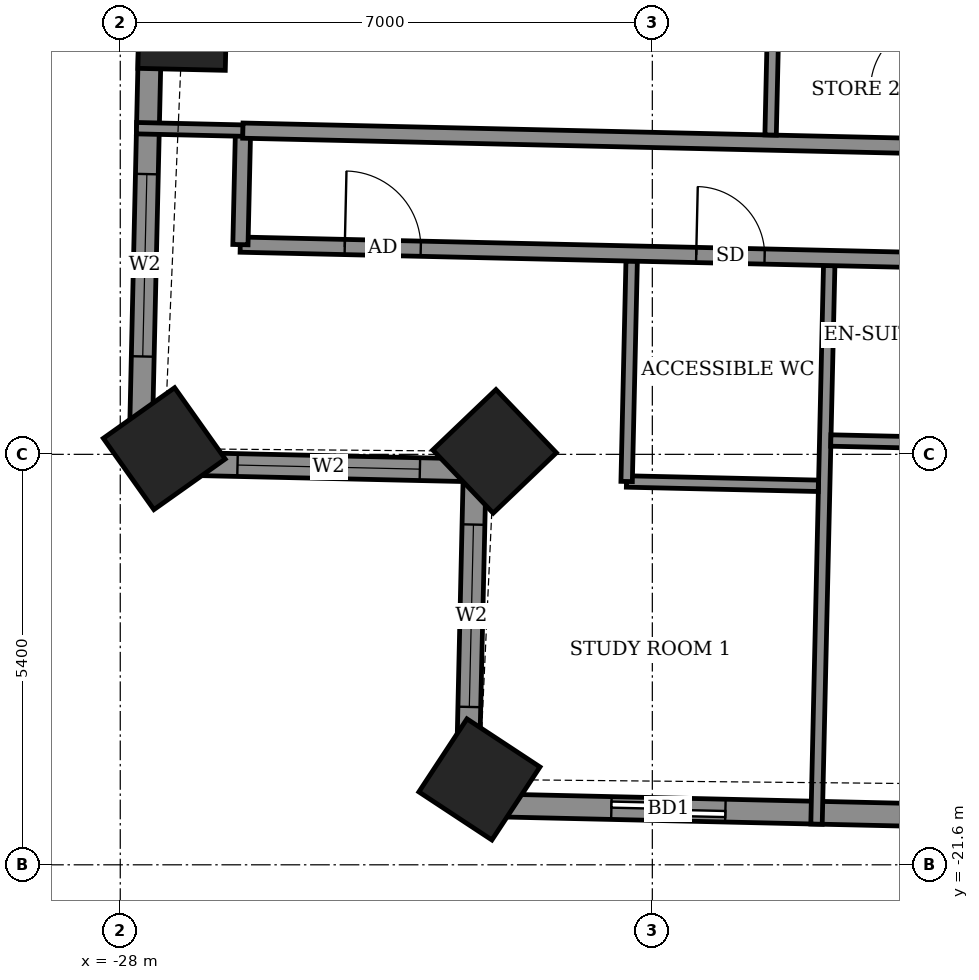
"""IFC4 building model, lengths in metres.
Left out: names, types, materials, properties, quantities, classifications, styles, units other than length and angle.
Written with IfcOpenShell. Run it as: python <this file> out.ifc"""

import sys

from ifc_helpers import new_model, si_unit, direction, frame, frame_2d, origin, origin_2d, place, context, subcontext, project, spatial, rectangle, extrude, element, fill, save


model = new_model("IFC4")
c1 = context("Model", 3, precision=1e-05, world=origin(), true_north=direction((0.0, 1.0)))
c2 = subcontext(c1, "Body", "Model", "MODEL_VIEW")
j1 = project(units=[si_unit("LENGTHUNIT", "METRE"), si_unit("PLANEANGLEUNIT", "RADIAN")], contexts=[c1])
p1 = place(None, origin())
s1 = spatial("IfcSite", under=j1, at=p1, CompositionType="ELEMENT")
p2 = place(p1, origin())
s2 = spatial("IfcBuilding", under=s1, at=p2, CompositionType="ELEMENT")
p3 = place(p2, frame((0.0, 0.0, 201.5)))
s3 = spatial("IfcBuildingStorey", under=s2, at=p3, CompositionType="ELEMENT", Elevation=201.5)
for number, where, z_axis, x_axis in (
    (1, (-27.18, -10.56, -0.55), (0.0, 0.0, 1.0), (-0.023, -1.0, 0.0)),
    (2, (-27.421, -16.125, -0.55), (0.0, 0.0, 1.0), (0.579, -0.816, 0.0)),
    (3, (-23.075, -16.161, -0.55), (0.0, 0.0, 1.0), (0.691, -0.723, 0.0)),
    (4, (-23.275, -20.477, -0.55), (0.0, 0.0, 1.0), (0.835, -0.55, 0.0)),
):
    element("IfcColumn", number, at=place(p3, frame(where, z_axis=z_axis, x_axis=x_axis)), inside=s3, PredefinedType="COLUMN", context=c2, shape_type="SweptSolid", body=[
        extrude(rectangle(XDim=1.15, YDim=1.15, at=origin_2d()), origin(), (0.0, 0.0, 1.0), 3.6),
    ])
p4 = place(p3, frame((-27.47, -4.585, 0.0), z_axis=(0.0, 0.0, 1.0), x_axis=(-0.022686419344, -0.999742630069, 0.0)))
e5 = element("IfcWall", 5, at=p4, inside=s3, PredefinedType="SOLIDWALL", context=c2, shape_type="SweptSolid", body=[
    extrude(rectangle(XDim=11.73, YDim=0.3, at=frame_2d((5.865, 0.0))), origin(), (0.0, 0.0, 1.0), 2.55),
])
p5 = place(p4, frame((2.261, 0.0, 0.0)))
e6 = element("IfcOpeningElement", 6, at=p5, cuts=e5, PredefinedType="OPENING", context=c2, shape_type="SweptSolid", body=[
    extrude(rectangle(XDim=1.5, YDim=2.4, at=frame_2d((0.75, 1.2))), frame((0.0, 0.16, 0.0), z_axis=(0.0, -1.0, 0.0), x_axis=(1.0, 0.0, 0.0)), (0.0, 0.0, 1.0), 0.32),
])
p6 = place(p4, frame((7.93, 0.0, 0.9)))
e7 = element("IfcOpeningElement", 7, at=p6, cuts=e5, PredefinedType="OPENING", context=c2, shape_type="SweptSolid", body=[
    extrude(rectangle(XDim=2.4, YDim=1.5, at=frame_2d((1.2, 0.75))), frame((0.0, 0.16, 0.0), z_axis=(0.0, -1.0, 0.0), x_axis=(1.0, 0.0, 0.0)), (0.0, 0.0, 1.0), 0.32),
])
p7 = place(p3, frame((-27.736, -16.312, 0.0), z_axis=(0.0, 0.0, 1.0), x_axis=(0.999747504193, -0.022470599878, 0.0)))
e8 = element("IfcWall", 8, at=p7, inside=s3, PredefinedType="SOLIDWALL", context=c2, shape_type="SweptSolid", body=[
    extrude(rectangle(XDim=4.4, YDim=0.3, at=frame_2d((2.2, 0.0))), origin(), (0.0, 0.0, 1.0), 2.55),
])
p8 = place(p7, frame((1.279, 0.0, 0.9)))
e9 = element("IfcOpeningElement", 9, at=p8, cuts=e8, PredefinedType="OPENING", context=c2, shape_type="SweptSolid", body=[
    extrude(rectangle(XDim=2.4, YDim=1.5, at=frame_2d((1.2, 0.75))), frame((0.0, 0.16, 0.0), z_axis=(0.0, -1.0, 0.0), x_axis=(1.0, 0.0, 0.0)), (0.0, 0.0, 1.0), 0.32),
])
p9 = place(p3, frame((-23.337, -16.411, 0.0), z_axis=(0.0, 0.0, 1.0), x_axis=(-0.022747872013, -0.999741233679, 0.0)))
e10 = element("IfcWall", 10, at=p9, inside=s3, PredefinedType="SOLIDWALL", context=c2, shape_type="SweptSolid", body=[
    extrude(rectangle(XDim=4.4, YDim=0.3, at=frame_2d((2.2, 0.0))), origin(), (0.0, 0.0, 1.0), 2.55),
])
p10 = place(p9, frame((0.713, 0.0, 0.9)))
e11 = element("IfcOpeningElement", 11, at=p10, cuts=e10, PredefinedType="OPENING", context=c2, shape_type="SweptSolid", body=[
    extrude(rectangle(XDim=2.4, YDim=1.5, at=frame_2d((1.2, 0.75))), frame((0.0, 0.16, 0.0), z_axis=(0.0, -1.0, 0.0), x_axis=(1.0, 0.0, 0.0)), (0.0, 0.0, 1.0), 0.32),
])
p11 = place(p3, frame((-23.437, -20.81, 0.0), z_axis=(0.0, 0.0, 1.0), x_axis=(0.999742269115, -0.022702320244, 0.0)))
e12 = element("IfcWall", 12, at=p11, inside=s3, PredefinedType="SOLIDWALL", context=c2, shape_type="SweptSolid", body=[
    extrude(rectangle(XDim=41.844, YDim=0.3, at=frame_2d((20.922, 0.0))), origin(), (0.0, 0.0, 1.0), 2.55),
])
p12 = place(p11, frame((1.899, 0.0, 0.0)))
e13 = element("IfcOpeningElement", 13, at=p12, cuts=e12, PredefinedType="OPENING", context=c2, shape_type="SweptSolid", body=[
    extrude(rectangle(XDim=1.5, YDim=2.4, at=frame_2d((0.75, 1.2))), frame((0.0, 0.16, 0.0), z_axis=(0.0, -1.0, 0.0), x_axis=(1.0, 0.0, 0.0)), (0.0, 0.0, 1.0), 0.32),
])
p13 = place(p11, frame((7.575, 0.0, 0.0)))
e14 = element("IfcOpeningElement", 14, at=p13, cuts=e12, PredefinedType="OPENING", context=c2, shape_type="SweptSolid", body=[
    extrude(rectangle(XDim=1.2, YDim=2.4, at=frame_2d((0.6, 1.2))), frame((0.0, 0.16, 0.0), z_axis=(0.0, -1.0, 0.0), x_axis=(1.0, 0.0, 0.0)), (0.0, 0.0, 1.0), 0.32),
])
p14 = place(p11, frame((10.612, 0.0, 0.0)))
e15 = element("IfcOpeningElement", 15, at=p14, cuts=e12, PredefinedType="OPENING", context=c2, shape_type="SweptSolid", body=[
    extrude(rectangle(XDim=1.5, YDim=2.4, at=frame_2d((0.75, 1.2))), frame((0.0, 0.16, 0.0), z_axis=(0.0, -1.0, 0.0), x_axis=(1.0, 0.0, 0.0)), (0.0, 0.0, 1.0), 0.32),
])
p15 = place(p11, frame((15.762, 0.0, 0.0)))
e16 = element("IfcOpeningElement", 16, at=p15, cuts=e12, PredefinedType="OPENING", context=c2, shape_type="SweptSolid", body=[
    extrude(rectangle(XDim=1.5, YDim=2.4, at=frame_2d((0.75, 1.2))), frame((0.0, 0.16, 0.0), z_axis=(0.0, -1.0, 0.0), x_axis=(1.0, 0.0, 0.0)), (0.0, 0.0, 1.0), 0.32),
])
p16 = place(p11, frame((21.648, 0.0, 0.0)))
e17 = element("IfcOpeningElement", 17, at=p16, cuts=e12, PredefinedType="OPENING", context=c2, shape_type="SweptSolid", body=[
    extrude(rectangle(XDim=1.2, YDim=2.4, at=frame_2d((0.6, 1.2))), frame((0.0, 0.16, 0.0), z_axis=(0.0, -1.0, 0.0), x_axis=(1.0, 0.0, 0.0)), (0.0, 0.0, 1.0), 0.32),
])
p17 = place(p11, frame((24.685, 0.0, 0.0)))
e18 = element("IfcOpeningElement", 18, at=p17, cuts=e12, PredefinedType="OPENING", context=c2, shape_type="SweptSolid", body=[
    extrude(rectangle(XDim=1.5, YDim=2.4, at=frame_2d((0.75, 1.2))), frame((0.0, 0.16, 0.0), z_axis=(0.0, -1.0, 0.0), x_axis=(1.0, 0.0, 0.0)), (0.0, 0.0, 1.0), 0.32),
])
p18 = place(p11, frame((29.685, 0.0, 0.0)))
e19 = element("IfcOpeningElement", 19, at=p18, cuts=e12, PredefinedType="OPENING", context=c2, shape_type="SweptSolid", body=[
    extrude(rectangle(XDim=1.5, YDim=2.4, at=frame_2d((0.75, 1.2))), frame((0.0, 0.16, 0.0), z_axis=(0.0, -1.0, 0.0), x_axis=(1.0, 0.0, 0.0)), (0.0, 0.0, 1.0), 0.32),
])
p19 = place(p11, frame((33.022, 0.0, 0.0)))
e20 = element("IfcOpeningElement", 20, at=p19, cuts=e12, PredefinedType="OPENING", context=c2, shape_type="SweptSolid", body=[
    extrude(rectangle(XDim=1.2, YDim=2.4, at=frame_2d((0.6, 1.2))), frame((0.0, 0.16, 0.0), z_axis=(0.0, -1.0, 0.0), x_axis=(1.0, 0.0, 0.0)), (0.0, 0.0, 1.0), 0.32),
])
p20 = place(p11, frame((37.974, 0.0, 0.9)))
e21 = element("IfcOpeningElement", 21, at=p20, cuts=e12, PredefinedType="OPENING", context=c2, shape_type="SweptSolid", body=[
    extrude(rectangle(XDim=2.4, YDim=1.5, at=frame_2d((1.2, 0.75))), frame((0.0, 0.16, 0.0), z_axis=(0.0, -1.0, 0.0), x_axis=(1.0, 0.0, 0.0)), (0.0, 0.0, 1.0), 0.32),
])
p21 = place(p3, frame((-18.84, -21.065, 0.0), z_axis=(0.0, 0.0, 1.0), x_axis=(0.022720650804, 0.999741852694, 0.0)))
e22 = element("IfcWall", 22, at=p21, inside=s3, PredefinedType="PARTITIONING", context=c2, shape_type="SweptSolid", body=[
    extrude(rectangle(XDim=7.35, YDim=0.15, at=frame_2d((3.675, 0.0))), origin(), (0.0, 0.0, 1.0), 2.55),
])
p22 = place(p3, frame((-21.34, -16.557, 0.0), z_axis=(0.0, 0.0, 1.0), x_axis=(0.999743977673, -0.022626955293, 0.0)))
e23 = element("IfcWall", 23, at=p22, inside=s3, PredefinedType="PARTITIONING", context=c2, shape_type="SweptSolid", body=[
    extrude(rectangle(XDim=2.525, YDim=0.15, at=frame_2d((1.262, 0.0))), origin(), (0.0, 0.0, 1.0), 3.05),
])
p23 = place(p3, frame((-21.338, -16.557, 0.0), z_axis=(0.0, 0.0, 1.0), x_axis=(0.022732880677, 0.999741574676, 0.0)))
e24 = element("IfcWall", 24, at=p23, inside=s3, PredefinedType="PARTITIONING", context=c2, shape_type="SweptSolid", body=[
    extrude(rectangle(XDim=2.9, YDim=0.15, at=frame_2d((1.45, 0.0))), origin(), (0.0, 0.0, 1.0), 3.05),
])
p24 = place(p3, frame((-18.652, -16.018, 0.0), z_axis=(0.0, 0.0, 1.0), x_axis=(0.999749797124, -0.022368351553, 0.0)))
e25 = element("IfcWall", 25, at=p24, inside=s3, PredefinedType="PARTITIONING", context=c2, shape_type="SweptSolid", body=[
    extrude(rectangle(XDim=2.325, YDim=0.15, at=frame_2d((1.162, 0.0))), origin(), (0.0, 0.0, 1.0), 3.05),
])
p25 = place(p3, frame((-26.421, -13.441, 0.0), z_axis=(0.0, 0.0, 1.0), x_axis=(0.999742754064, -0.022680954485, 0.0)))
e26 = element("IfcWall", 26, at=p25, inside=s3, PredefinedType="PARTITIONING", context=c2, shape_type="SweptSolid", body=[
    extrude(rectangle(XDim=48.945, YDim=0.2, at=frame_2d((24.472, 0.0))), origin(), (0.0, 0.0, 1.0), 3.05),
])
p26 = place(p25, frame((1.375, 0.0, 0.0)))
e27 = element("IfcOpeningElement", 27, at=p26, cuts=e26, PredefinedType="OPENING", context=c2, shape_type="SweptSolid", body=[
    extrude(rectangle(XDim=1.0, YDim=2.1, at=frame_2d((0.5, 1.05))), frame((0.0, 0.11, 0.0), z_axis=(0.0, -1.0, 0.0), x_axis=(1.0, 0.0, 0.0)), (0.0, 0.0, 1.0), 0.22),
])
p27 = place(p25, frame((6.0, 0.0, 0.0)))
e28 = element("IfcOpeningElement", 28, at=p27, cuts=e26, PredefinedType="OPENING", context=c2, shape_type="SweptSolid", body=[
    extrude(rectangle(XDim=0.9, YDim=2.1, at=frame_2d((0.45, 1.05))), frame((0.0, 0.11, 0.0), z_axis=(0.0, -1.0, 0.0), x_axis=(1.0, 0.0, 0.0)), (0.0, 0.0, 1.0), 0.22),
])
p28 = place(p25, frame((10.775, 0.0, 0.0)))
e29 = element("IfcOpeningElement", 29, at=p28, cuts=e26, PredefinedType="OPENING", context=c2, shape_type="SweptSolid", body=[
    extrude(rectangle(XDim=0.9, YDim=2.1, at=frame_2d((0.45, 1.05))), frame((0.0, 0.11, 0.0), z_axis=(0.0, -1.0, 0.0), x_axis=(1.0, 0.0, 0.0)), (0.0, 0.0, 1.0), 0.22),
])
p29 = place(p25, frame((13.05, 0.0, 0.0)))
e30 = element("IfcOpeningElement", 30, at=p29, cuts=e26, PredefinedType="OPENING", context=c2, shape_type="SweptSolid", body=[
    extrude(rectangle(XDim=0.9, YDim=2.1, at=frame_2d((0.45, 1.05))), frame((0.0, 0.11, 0.0), z_axis=(0.0, -1.0, 0.0), x_axis=(1.0, 0.0, 0.0)), (0.0, 0.0, 1.0), 0.22),
])
p30 = place(p25, frame((20.275, 0.0, 0.0)))
e31 = element("IfcOpeningElement", 31, at=p30, cuts=e26, PredefinedType="OPENING", context=c2, shape_type="SweptSolid", body=[
    extrude(rectangle(XDim=0.9, YDim=2.1, at=frame_2d((0.45, 1.05))), frame((0.0, 0.11, 0.0), z_axis=(0.0, -1.0, 0.0), x_axis=(1.0, 0.0, 0.0)), (0.0, 0.0, 1.0), 0.22),
])
p31 = place(p25, frame((22.525, 0.0, 0.0)))
e32 = element("IfcOpeningElement", 32, at=p31, cuts=e26, PredefinedType="OPENING", context=c2, shape_type="SweptSolid", body=[
    extrude(rectangle(XDim=0.9, YDim=2.1, at=frame_2d((0.45, 1.05))), frame((0.0, 0.11, 0.0), z_axis=(0.0, -1.0, 0.0), x_axis=(1.0, 0.0, 0.0)), (0.0, 0.0, 1.0), 0.22),
])
p32 = place(p25, frame((29.6, 0.0, 0.0)))
e33 = element("IfcOpeningElement", 33, at=p32, cuts=e26, PredefinedType="OPENING", context=c2, shape_type="SweptSolid", body=[
    extrude(rectangle(XDim=0.9, YDim=2.1, at=frame_2d((0.45, 1.05))), frame((0.0, 0.11, 0.0), z_axis=(0.0, -1.0, 0.0), x_axis=(1.0, 0.0, 0.0)), (0.0, 0.0, 1.0), 0.22),
])
p33 = place(p25, frame((31.875, 0.0, 0.0)))
e34 = element("IfcOpeningElement", 34, at=p33, cuts=e26, PredefinedType="OPENING", context=c2, shape_type="SweptSolid", body=[
    extrude(rectangle(XDim=0.9, YDim=2.1, at=frame_2d((0.45, 1.05))), frame((0.0, 0.11, 0.0), z_axis=(0.0, -1.0, 0.0), x_axis=(1.0, 0.0, 0.0)), (0.0, 0.0, 1.0), 0.22),
])
p34 = place(p25, frame((38.85, 0.0, 0.0)))
e35 = element("IfcOpeningElement", 35, at=p34, cuts=e26, PredefinedType="OPENING", context=c2, shape_type="SweptSolid", body=[
    extrude(rectangle(XDim=0.9, YDim=2.1, at=frame_2d((0.45, 1.05))), frame((0.0, 0.11, 0.0), z_axis=(0.0, -1.0, 0.0), x_axis=(1.0, 0.0, 0.0)), (0.0, 0.0, 1.0), 0.22),
])
p35 = place(p25, frame((46.097, 0.0, 0.0)))
e36 = element("IfcOpeningElement", 36, at=p35, cuts=e26, PredefinedType="OPENING", context=c2, shape_type="SweptSolid", body=[
    extrude(rectangle(XDim=1.0, YDim=2.1, at=frame_2d((0.5, 1.05))), frame((0.0, 0.11, 0.0), z_axis=(0.0, -1.0, 0.0), x_axis=(1.0, 0.0, 0.0)), (0.0, 0.0, 1.0), 0.22),
])
p36 = place(p25, frame((41.2, 0.0, 0.0)))
e37 = element("IfcOpeningElement", 37, at=p36, cuts=e26, PredefinedType="OPENING", context=c2, shape_type="SweptSolid", body=[
    extrude(rectangle(XDim=0.9, YDim=2.1, at=frame_2d((0.45, 1.05))), frame((0.0, 0.11, 0.0), z_axis=(0.0, -1.0, 0.0), x_axis=(1.0, 0.0, 0.0)), (0.0, 0.0, 1.0), 0.22),
])
p37 = place(p3, frame((-26.419, -13.441, 0.0), z_axis=(0.0, 0.0, 1.0), x_axis=(0.022617910375, 0.999744182344, 0.0)))
e38 = element("IfcWall", 38, at=p37, inside=s3, PredefinedType="PARTITIONING", context=c2, shape_type="SweptSolid", body=[
    extrude(rectangle(XDim=1.5, YDim=0.2, at=frame_2d((0.75, 0.0))), origin(), (0.0, 0.0, 1.0), 3.05),
])
p38 = place(p3, frame((-27.786, -11.909, 0.0), z_axis=(0.0, 0.0, 1.0), x_axis=(0.999740216184, -0.022792545827, 0.0)))
e39 = element("IfcWall", 39, at=p38, inside=s3, PredefinedType="PARTITIONING", context=c2, shape_type="SweptSolid", body=[
    extrude(rectangle(XDim=1.403, YDim=0.15, at=frame_2d((0.702, 0.0))), origin(), (0.0, 0.0, 1.0), 2.55),
])
p39 = place(p3, frame((-26.387, -11.941, 0.0), z_axis=(0.0, 0.0, 1.0), x_axis=(0.999741076645, -0.022754772455, 0.0)))
e40 = element("IfcWall", 40, at=p39, inside=s3, PredefinedType="PARTITIONING", context=c2, shape_type="SweptSolid", body=[
    extrude(rectangle(XDim=9.141, YDim=0.2, at=frame_2d((4.571, 0.0))), origin(), (0.0, 0.0, 1.0), 3.05),
])
p40 = place(p3, frame((-19.444, -11.999, 0.0), z_axis=(0.0, 0.0, 1.0), x_axis=(0.022603288534, 0.999744513037, 0.0)))
e41 = element("IfcWall", 41, at=p40, inside=s3, PredefinedType="PARTITIONING", context=c2, shape_type="SweptSolid", body=[
    extrude(rectangle(XDim=2.301, YDim=0.15, at=frame_2d((1.15, 0.0))), origin(), (0.0, 0.0, 1.0), 3.05),
])
p41 = place(p6, origin())
e42 = element("IfcWindow", 42, at=p41, inside=s3, PartitioningType="DOUBLE_PANEL_VERTICAL", PredefinedType="WINDOW", context=c2, shape_type="SweptSolid", body=[
    extrude(rectangle(XDim=2.4, YDim=1.5, at=frame_2d((1.2, 0.75))), frame((0.0, 0.03, 0.0), z_axis=(0.0, -1.0, 0.0), x_axis=(1.0, 0.0, 0.0)), (0.0, 0.0, 1.0), 0.06),
])
fill(e7, e42)
p42 = place(p8, origin())
e43 = element("IfcWindow", 43, at=p42, inside=s3, PartitioningType="DOUBLE_PANEL_VERTICAL", PredefinedType="WINDOW", context=c2, shape_type="SweptSolid", body=[
    extrude(rectangle(XDim=2.4, YDim=1.5, at=frame_2d((1.2, 0.75))), frame((0.0, 0.03, 0.0), z_axis=(0.0, -1.0, 0.0), x_axis=(1.0, 0.0, 0.0)), (0.0, 0.0, 1.0), 0.06),
])
fill(e9, e43)
p43 = place(p10, origin())
e44 = element("IfcWindow", 44, at=p43, inside=s3, PartitioningType="DOUBLE_PANEL_VERTICAL", PredefinedType="WINDOW", context=c2, shape_type="SweptSolid", body=[
    extrude(rectangle(XDim=2.4, YDim=1.5, at=frame_2d((1.2, 0.75))), frame((0.0, 0.03, 0.0), z_axis=(0.0, -1.0, 0.0), x_axis=(1.0, 0.0, 0.0)), (0.0, 0.0, 1.0), 0.06),
])
fill(e11, e44)
p44 = place(p12, origin())
e45 = element("IfcDoor", 45, at=p44, inside=s3, OperationType="SLIDING_TO_LEFT", PredefinedType="DOOR", context=c2, shape_type="SweptSolid", body=[
    extrude(rectangle(XDim=1.5, YDim=2.4, at=frame_2d((0.75, 1.2))), frame((0.0, 0.025, 0.0), z_axis=(0.0, -1.0, 0.0), x_axis=(1.0, 0.0, 0.0)), (0.0, 0.0, 1.0), 0.05),
])
fill(e13, e45)
p45 = place(p26, origin())
e46 = element("IfcDoor", 46, at=p45, inside=s3, OperationType="SINGLE_SWING_LEFT", PredefinedType="DOOR", context=c2, shape_type="SweptSolid", body=[
    extrude(rectangle(XDim=1.0, YDim=2.1, at=frame_2d((0.5, 1.05))), frame((0.0, 0.025, 0.0), z_axis=(0.0, -1.0, 0.0), x_axis=(1.0, 0.0, 0.0)), (0.0, 0.0, 1.0), 0.05),
])
fill(e27, e46)
p46 = place(p27, origin())
e47 = element("IfcDoor", 47, at=p46, inside=s3, OperationType="SINGLE_SWING_LEFT", PredefinedType="DOOR", context=c2, shape_type="SweptSolid", body=[
    extrude(rectangle(XDim=0.9, YDim=2.1, at=frame_2d((0.45, 1.05))), frame((0.0, 0.025, 0.0), z_axis=(0.0, -1.0, 0.0), x_axis=(1.0, 0.0, 0.0)), (0.0, 0.0, 1.0), 0.05),
])
fill(e28, e47)
save(model, sys.argv[1])
